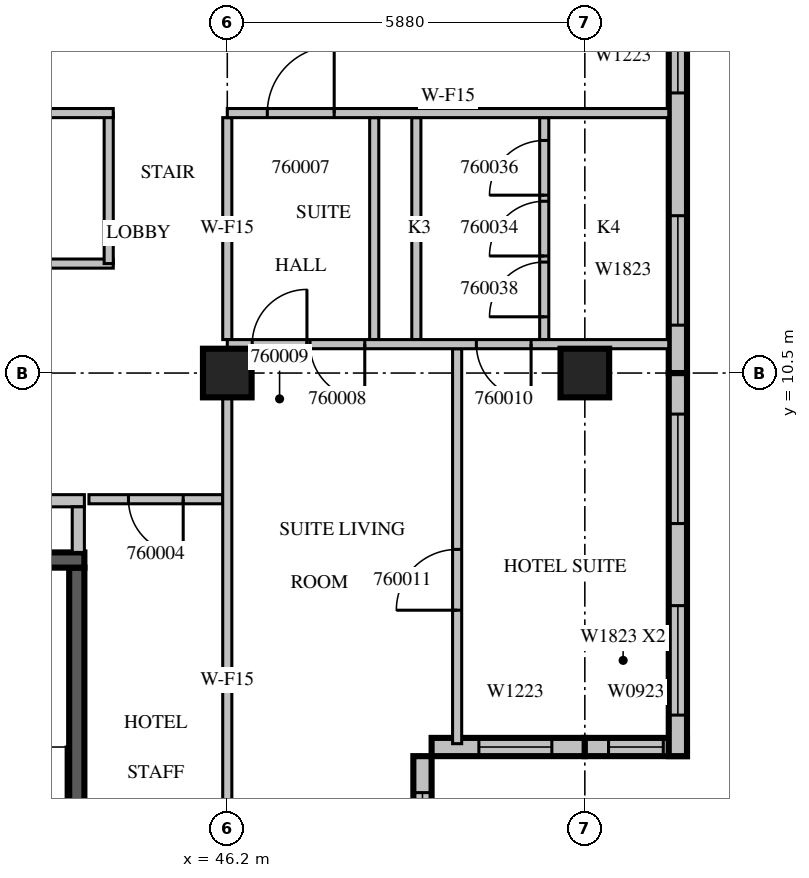
"""IFC4 building model, lengths in metres.
Left out: names, types, materials, properties, quantities, classifications, styles, units other than length and angle.
Written with IfcOpenShell. Run it as: python <this file> out.ifc"""

import sys

from ifc_helpers import new_model, si_unit, direction, frame, frame_2d, origin, origin_2d, place, context, subcontext, project, spatial, rectangle, extrude, source, transform, mapped, element, fill, save


model = new_model("IFC4")
c1 = context("Model", 3, precision=1e-05, world=origin(), true_north=direction((0.0, 1.0)))
c2 = subcontext(c1, "Body", "Model", "MODEL_VIEW")
j1 = project(units=[si_unit("LENGTHUNIT", "METRE"), si_unit("PLANEANGLEUNIT", "RADIAN")], contexts=[c1])
p1 = place(None, origin())
s1 = spatial("IfcSite", under=j1, at=p1, CompositionType="ELEMENT")
p2 = place(p1, origin())
s2 = spatial("IfcBuilding", under=s1, at=p2, CompositionType="ELEMENT")
p3 = place(p2, frame((0.0, 0.0, 261.4)))
s3 = spatial("IfcBuildingStorey", under=s2, at=p3, CompositionType="ELEMENT", Elevation=261.4)
m1 = source(origin(), c2, "Body", "SweptSolid", [
    extrude(rectangle(XDim=0.8, YDim=0.8, at=origin_2d()), origin(), (0.0, 0.0, 1.0), 3.8),
])
for number, where, z_axis, x_axis in (
    (1, (46.2, 10.5, 0.0), (0.0, 0.0, 1.0), (1.0, 0.0, 0.0)),
    (2, (52.08, 10.5, 0.0), (0.0, 0.0, 1.0), (1.0, 0.0, 0.0)),
):
    element("IfcColumn", number, at=place(p3, frame(where, z_axis=z_axis, x_axis=x_axis)), inside=s3, PredefinedType="COLUMN", context=c2, shape_type="MappedRepresentation", body=[
        mapped(m1, transform((0.0, 0.0, 0.0), scale=1.0)),
    ])
m2 = source(origin(), c2, "Body", "SweptSolid", [
    extrude(rectangle(XDim=4.2, YDim=0.3, at=frame_2d((2.1, 0.0))), origin(), (0.0, 0.0, 1.0), 3.4),
])
p4 = place(p3, frame((49.41, 0.0, 0.0), z_axis=(0.0, 0.0, 1.0), x_axis=(0.0, 1.0, 0.0)))
e3 = element("IfcWall", 3, at=p4, inside=s3, PredefinedType="STANDARD", context=c2, shape_type="MappedRepresentation", body=[
    mapped(m2, transform((0.0, 0.0, 0.0), scale=1.0)),
])
m3 = source(origin(), c2, "Body", "SweptSolid", [
    extrude(rectangle(XDim=3.0, YDim=2.3, at=frame_2d((1.5, 1.15))), frame((0.0, 0.16, 0.0), z_axis=(0.0, -1.0, 0.0), x_axis=(1.0, 0.0, 0.0)), (0.0, 0.0, 1.0), 0.32),
])
p5 = place(p4, frame((0.6, 0.0, 0.6)))
e4 = element("IfcOpeningElement", 4, at=p5, cuts=e3, PredefinedType="OPENING", context=c2, shape_type="MappedRepresentation", body=[
    mapped(m3, transform((0.0, 0.0, 0.0), scale=1.0)),
])
m4 = source(origin(), c2, "Body", "SweptSolid", [
    extrude(rectangle(XDim=2.52, YDim=0.3, at=frame_2d((1.26, 0.0))), origin(), (0.0, 0.0, 1.0), 3.4),
])
p6 = place(p3, frame((49.56, 4.35, 0.0), z_axis=(0.0, 0.0, 1.0), x_axis=(1.0, 0.0, 0.0)))
e5 = element("IfcWall", 5, at=p6, inside=s3, PredefinedType="STANDARD", context=c2, shape_type="MappedRepresentation", body=[
    mapped(m4, transform((0.0, 0.0, 0.0), scale=1.0)),
])
m5 = source(origin(), c2, "Body", "SweptSolid", [
    extrude(rectangle(XDim=1.2, YDim=2.3, at=frame_2d((0.6, 1.15))), frame((0.0, 0.16, 0.0), z_axis=(0.0, -1.0, 0.0), x_axis=(1.0, 0.0, 0.0)), (0.0, 0.0, 1.0), 0.32),
])
p7 = place(p6, frame((0.777, 0.0, 0.6)))
e6 = element("IfcOpeningElement", 6, at=p7, cuts=e5, PredefinedType="OPENING", context=c2, shape_type="MappedRepresentation", body=[
    mapped(m5, transform((0.0, 0.0, 0.0), scale=1.0)),
])
m6 = source(origin(), c2, "Body", "SweptSolid", [
    extrude(rectangle(XDim=1.68, YDim=0.3, at=frame_2d((0.84, 0.0))), origin(), (0.0, 0.0, 1.0), 3.4),
])
p8 = place(p3, frame((52.08, 4.35, 0.0), z_axis=(0.0, 0.0, 1.0), x_axis=(1.0, 0.0, 0.0)))
e7 = element("IfcWall", 7, at=p8, inside=s3, PredefinedType="STANDARD", context=c2, shape_type="MappedRepresentation", body=[
    mapped(m6, transform((0.0, 0.0, 0.0), scale=1.0)),
])
m7 = source(origin(), c2, "Body", "SweptSolid", [
    extrude(rectangle(XDim=0.9, YDim=2.3, at=frame_2d((0.45, 1.15))), frame((0.0, 0.16, 0.0), z_axis=(0.0, -1.0, 0.0), x_axis=(1.0, 0.0, 0.0)), (0.0, 0.0, 1.0), 0.32),
])
p9 = place(p8, frame((0.39, 0.0, 0.6)))
e8 = element("IfcOpeningElement", 8, at=p9, cuts=e7, PredefinedType="OPENING", context=c2, shape_type="MappedRepresentation", body=[
    mapped(m7, transform((0.0, 0.0, 0.0), scale=1.0)),
])
m8 = source(origin(), c2, "Body", "SweptSolid", [
    extrude(rectangle(XDim=6.3, YDim=0.3, at=frame_2d((3.15, 0.0))), origin(), (0.0, 0.0, 1.0), 3.4),
])
p10 = place(p3, frame((53.61, 4.2, 0.0), z_axis=(0.0, 0.0, 1.0), x_axis=(0.0, 1.0, 0.0)))
e9 = element("IfcWall", 9, at=p10, inside=s3, PredefinedType="STANDARD", context=c2, shape_type="MappedRepresentation", body=[
    mapped(m8, transform((0.0, 0.0, 0.0), scale=1.0)),
])
m9 = source(origin(), c2, "Body", "SweptSolid", [
    extrude(rectangle(XDim=1.8, YDim=2.3, at=frame_2d((0.9, 1.15))), frame((0.0, 0.16, 0.0), z_axis=(0.0, -1.0, 0.0), x_axis=(1.0, 0.0, 0.0)), (0.0, 0.0, 1.0), 0.32),
])
p11 = place(p10, frame((0.675, 0.0, 0.6)))
e10 = element("IfcOpeningElement", 10, at=p11, cuts=e9, PredefinedType="OPENING", context=c2, shape_type="MappedRepresentation", body=[
    mapped(m9, transform((0.0, 0.0, 0.0), scale=1.0)),
])
p12 = place(p10, frame((3.825, 0.0, 0.6)))
e11 = element("IfcOpeningElement", 11, at=p12, cuts=e9, PredefinedType="OPENING", context=c2, shape_type="MappedRepresentation", body=[
    mapped(m9, transform((0.0, 0.0, 0.0), scale=1.0)),
])
m10 = source(origin(), c2, "Body", "SweptSolid", [
    extrude(rectangle(XDim=6.75, YDim=0.3, at=frame_2d((3.375, 0.0))), origin(), (0.0, 0.0, 1.0), 3.4),
])
p13 = place(p3, frame((53.61, 10.5, 0.0), z_axis=(0.0, 0.0, 1.0), x_axis=(0.0, 1.0, 0.0)))
e12 = element("IfcWall", 12, at=p13, inside=s3, PredefinedType="STANDARD", context=c2, shape_type="MappedRepresentation", body=[
    mapped(m10, transform((0.0, 0.0, 0.0), scale=1.0)),
])
p14 = place(p13, frame((0.787, 0.0, 0.6)))
e13 = element("IfcOpeningElement", 13, at=p14, cuts=e12, PredefinedType="OPENING", context=c2, shape_type="MappedRepresentation", body=[
    mapped(m9, transform((0.0, 0.0, 0.0), scale=1.0)),
])
p15 = place(p13, frame((4.606, 0.0, 0.6)))
e14 = element("IfcOpeningElement", 14, at=p15, cuts=e12, PredefinedType="OPENING", context=c2, shape_type="MappedRepresentation", body=[
    mapped(m5, transform((0.0, 0.0, 0.0), scale=1.0)),
])
m11 = source(origin(), c2, "Body", "SweptSolid", [
    extrude(rectangle(XDim=7.0, YDim=0.25, at=frame_2d((3.5, 0.0))), origin(), (0.0, 0.0, 1.0), 3.4),
])
p16 = place(p3, frame((43.725, 0.3, 0.0), z_axis=(0.0, 0.0, 1.0), x_axis=(0.0, 1.0, 0.0)))
e15 = element("IfcWall", 15, at=p16, inside=s3, PredefinedType="SOLIDWALL", context=c2, shape_type="MappedRepresentation", body=[
    mapped(m11, transform((0.0, 0.0, 0.0), scale=1.0)),
])
m12 = source(origin(), c2, "Body", "SweptSolid", [
    extrude(rectangle(XDim=3.45, YDim=0.25, at=frame_2d((1.725, 0.0))), origin(), (0.0, 0.0, 1.0), 3.4),
])
p17 = place(p3, frame((40.4, 7.425, 0.0), z_axis=(0.0, 0.0, 1.0), x_axis=(1.0, 0.0, 0.0)))
e16 = element("IfcWall", 16, at=p17, inside=s3, PredefinedType="SOLIDWALL", context=c2, shape_type="MappedRepresentation", body=[
    mapped(m12, transform((0.0, 0.0, 0.0), scale=1.0)),
])
m13 = source(origin(), c2, "Body", "SweptSolid", [
    extrude(rectangle(XDim=5.45, YDim=0.2, at=frame_2d((2.725, 0.0))), origin(), (0.0, 0.0, 1.0), 3.4),
])
p18 = place(p3, frame((38.4, 8.4, 0.0), z_axis=(0.0, 0.0, 1.0), x_axis=(1.0, 0.0, 0.0)))
e17 = element("IfcWall", 17, at=p18, inside=s3, PredefinedType="PARTITIONING", context=c2, shape_type="MappedRepresentation", body=[
    mapped(m13, transform((0.0, 0.0, 0.0), scale=1.0)),
])
m14 = source(origin(), c2, "Body", "SweptSolid", [
    extrude(rectangle(XDim=1.2, YDim=2.1, at=frame_2d((0.6, 1.05))), frame((0.0, 0.11, 0.0), z_axis=(0.0, -1.0, 0.0), x_axis=(1.0, 0.0, 0.0)), (0.0, 0.0, 1.0), 0.22),
])
p19 = place(p18, frame((0.4, 0.0, 0.0)))
e18 = element("IfcOpeningElement", 18, at=p19, cuts=e17, PredefinedType="OPENING", context=c2, shape_type="MappedRepresentation", body=[
    mapped(m14, transform((0.0, 0.0, 0.0), scale=1.0)),
])
m15 = source(origin(), c2, "Body", "SweptSolid", [
    extrude(rectangle(XDim=0.9, YDim=2.1, at=frame_2d((0.45, 1.05))), frame((0.0, 0.11, 0.0), z_axis=(0.0, -1.0, 0.0), x_axis=(1.0, 0.0, 0.0)), (0.0, 0.0, 1.0), 0.22),
])
p20 = place(p18, frame((3.25, 0.0, 0.0)))
e19 = element("IfcOpeningElement", 19, at=p20, cuts=e17, PredefinedType="OPENING", context=c2, shape_type="MappedRepresentation", body=[
    mapped(m15, transform((0.0, 0.0, 0.0), scale=1.0)),
])
m16 = source(origin(), c2, "Body", "SweptSolid", [
    extrude(rectangle(XDim=0.75, YDim=0.2, at=frame_2d((0.375, 0.0))), origin(), (0.0, 0.0, 1.0), 3.4),
])
p21 = place(p3, frame((43.75, 7.55, 0.0), z_axis=(0.0, 0.0, 1.0), x_axis=(0.0, 1.0, 0.0)))
e20 = element("IfcWall", 20, at=p21, inside=s3, PredefinedType="PARTITIONING", context=c2, shape_type="MappedRepresentation", body=[
    mapped(m16, transform((0.0, 0.0, 0.0), scale=1.0)),
])
m17 = source(origin(), c2, "Body", "SweptSolid", [
    extrude(rectangle(XDim=6.45, YDim=0.15, at=frame_2d((3.225, 0.0))), origin(), (0.0, 0.0, 1.0), 3.4),
])
p22 = place(p3, frame((37.875, 12.3, 0.0), z_axis=(0.0, 0.0, 1.0), x_axis=(1.0, 0.0, 0.0)))
e21 = element("IfcWall", 21, at=p22, inside=s3, PredefinedType="PARTITIONING", context=c2, shape_type="MappedRepresentation", body=[
    mapped(m17, transform((0.0, 0.0, 0.0), scale=1.0)),
])
m18 = source(origin(), c2, "Body", "SweptSolid", [
    extrude(rectangle(XDim=2.475, YDim=0.15, at=frame_2d((1.238, 0.0))), origin(), (0.0, 0.0, 1.0), 3.4),
])
p23 = place(p3, frame((44.25, 12.3, 0.0), z_axis=(0.0, 0.0, 1.0), x_axis=(0.0, 1.0, 0.0)))
e22 = element("IfcWall", 22, at=p23, inside=s3, PredefinedType="PARTITIONING", context=c2, shape_type="MappedRepresentation", body=[
    mapped(m18, transform((0.0, 0.0, 0.0), scale=1.0)),
])
p24 = place(p3, frame((44.325, 14.775, 0.0), z_axis=(0.0, 0.0, 1.0), x_axis=(-1.0, 0.0, 0.0)))
e23 = element("IfcWall", 23, at=p24, inside=s3, PredefinedType="PARTITIONING", context=c2, shape_type="MappedRepresentation", body=[
    mapped(m17, transform((0.0, 0.0, 0.0), scale=1.0)),
])
m19 = source(origin(), c2, "Body", "SweptSolid", [
    extrude(rectangle(XDim=0.9, YDim=2.1, at=frame_2d((0.45, 1.05))), frame((0.0, 0.085, 0.0), z_axis=(0.0, -1.0, 0.0), x_axis=(1.0, 0.0, 0.0)), (0.0, 0.0, 1.0), 0.17),
])
p25 = place(p24, frame((2.812, 0.0, 0.0)))
e24 = element("IfcOpeningElement", 24, at=p25, cuts=e23, PredefinedType="OPENING", context=c2, shape_type="MappedRepresentation", body=[
    mapped(m19, transform((0.0, 0.0, 0.0), scale=1.0)),
])
m20 = source(origin(), c2, "Body", "SweptSolid", [
    extrude(rectangle(XDim=2.2, YDim=0.15, at=frame_2d((1.1, 0.0))), origin(), (0.0, 0.0, 1.0), 3.4),
])
p26 = place(p3, frame((46.125, 8.425, 0.0), z_axis=(0.0, 0.0, 1.0), x_axis=(-1.0, 0.0, 0.0)))
e25 = element("IfcWall", 25, at=p26, inside=s3, PredefinedType="PARTITIONING", context=c2, shape_type="MappedRepresentation", body=[
    mapped(m20, transform((0.0, 0.0, 0.0), scale=1.0)),
])
p27 = place(p26, frame((0.65, 0.0, 0.0)))
e26 = element("IfcOpeningElement", 26, at=p27, cuts=e25, PredefinedType="OPENING", context=c2, shape_type="MappedRepresentation", body=[
    mapped(m19, transform((0.0, 0.0, 0.0), scale=1.0)),
])
m21 = source(origin(), c2, "Body", "SweptSolid", [
    extrude(rectangle(XDim=6.495, YDim=0.15, at=frame_2d((3.248, 0.0))), origin(), (0.0, 0.0, 1.0), 3.4),
])
p28 = place(p3, frame((49.98, 4.405, 0.0), z_axis=(0.0, 0.0, 1.0), x_axis=(0.0, 1.0, 0.0)))
e27 = element("IfcWall", 27, at=p28, inside=s3, PredefinedType="PARTITIONING", context=c2, shape_type="MappedRepresentation", body=[
    mapped(m21, transform((0.0, 0.0, 0.0), scale=1.0)),
])
m22 = source(origin(), c2, "Body", "SweptSolid", [
    extrude(rectangle(XDim=1.0, YDim=2.1, at=frame_2d((0.5, 1.05))), frame((0.0, 0.085, 0.0), z_axis=(0.0, -1.0, 0.0), x_axis=(1.0, 0.0, 0.0)), (0.0, 0.0, 1.0), 0.17),
])
p29 = place(p28, frame((2.195, 0.0, 0.0)))
e28 = element("IfcOpeningElement", 28, at=p29, cuts=e27, PredefinedType="OPENING", context=c2, shape_type="MappedRepresentation", body=[
    mapped(m22, transform((0.0, 0.0, 0.0), scale=1.0)),
])
m23 = source(origin(), c2, "Body", "SweptSolid", [
    extrude(rectangle(XDim=3.65, YDim=0.15, at=frame_2d((1.825, 0.0))), origin(), (0.0, 0.0, 1.0), 3.4),
])
for number, where, z_axis, x_axis in (
    (29, (48.617, 11.05, 0.0), (0.0, 0.0, 1.0), (0.0, 1.0, 0.0)),
    (30, (49.309, 11.05, 0.0), (0.0, 0.0, 1.0), (0.0, 1.0, 0.0)),
):
    element("IfcWall", number, at=place(p3, frame(where, z_axis=z_axis, x_axis=x_axis)), inside=s3, PredefinedType="PARTITIONING", context=c2, shape_type="MappedRepresentation", body=[
        mapped(m23, transform((0.0, 0.0, 0.0), scale=1.0)),
    ])
p30 = place(p3, frame((51.412, 11.05, 0.0), z_axis=(0.0, 0.0, 1.0), x_axis=(0.0, 1.0, 0.0)))
e31 = element("IfcWall", 31, at=p30, inside=s3, PredefinedType="PARTITIONING", context=c2, shape_type="MappedRepresentation", body=[
    mapped(m23, transform((0.0, 0.0, 0.0), scale=1.0)),
])
p31 = place(p30, frame((1.375, 0.0, 0.0)))
e32 = element("IfcOpeningElement", 32, at=p31, cuts=e31, PredefinedType="OPENING", context=c2, shape_type="MappedRepresentation", body=[
    mapped(m19, transform((0.0, 0.0, 0.0), scale=1.0)),
])
p32 = place(p30, frame((2.375, 0.0, 0.0)))
e33 = element("IfcOpeningElement", 33, at=p32, cuts=e31, PredefinedType="OPENING", context=c2, shape_type="MappedRepresentation", body=[
    mapped(m19, transform((0.0, 0.0, 0.0), scale=1.0)),
])
p33 = place(p30, frame((0.375, 0.0, 0.0)))
e34 = element("IfcOpeningElement", 34, at=p33, cuts=e31, PredefinedType="OPENING", context=c2, shape_type="MappedRepresentation", body=[
    mapped(m19, transform((0.0, 0.0, 0.0), scale=1.0)),
])
m24 = source(origin(), c2, "Body", "SweptSolid", [
    extrude(rectangle(XDim=9.302, YDim=0.15, at=frame_2d((4.651, 0.0))), origin(), (0.0, 0.0, 1.0), 3.4),
])
p34 = place(p3, frame((46.2, 0.799, 0.0), z_axis=(0.0, 0.0, 1.0), x_axis=(0.0, 1.0, 0.0)))
e35 = element("IfcWall", 35, at=p34, inside=s3, PredefinedType="PARTITIONING", context=c2, shape_type="MappedRepresentation", body=[
    mapped(m24, transform((0.0, 0.0, 0.0), scale=1.0)),
])
p35 = place(p3, frame((46.2, 11.05, 0.0), z_axis=(0.0, 0.0, 1.0), x_axis=(0.0, 1.0, 0.0)))
e36 = element("IfcWall", 36, at=p35, inside=s3, PredefinedType="PARTITIONING", context=c2, shape_type="MappedRepresentation", body=[
    mapped(m23, transform((0.0, 0.0, 0.0), scale=1.0)),
])
m25 = source(origin(), c2, "Body", "SweptSolid", [
    extrude(rectangle(XDim=7.26, YDim=0.15, at=frame_2d((3.63, 0.0))), origin(), (0.0, 0.0, 1.0), 3.4),
])
p36 = place(p3, frame((53.46, 10.975, 0.0), z_axis=(0.0, 0.0, 1.0), x_axis=(-1.0, 0.0, 0.0)))
e37 = element("IfcWall", 37, at=p36, inside=s3, PredefinedType="PARTITIONING", context=c2, shape_type="MappedRepresentation", body=[
    mapped(m25, transform((0.0, 0.0, 0.0), scale=1.0)),
])
p37 = place(p36, frame((4.999, 0.0, 0.0)))
e38 = element("IfcOpeningElement", 38, at=p37, cuts=e37, PredefinedType="OPENING", context=c2, shape_type="MappedRepresentation", body=[
    mapped(m19, transform((0.0, 0.0, 0.0), scale=1.0)),
])
p38 = place(p36, frame((5.95, 0.0, 0.0)))
e39 = element("IfcOpeningElement", 39, at=p38, cuts=e37, PredefinedType="OPENING", context=c2, shape_type="MappedRepresentation", body=[
    mapped(m19, transform((0.0, 0.0, 0.0), scale=1.0)),
])
p39 = place(p36, frame((2.264, 0.0, 0.0)))
e40 = element("IfcOpeningElement", 40, at=p39, cuts=e37, PredefinedType="OPENING", context=c2, shape_type="MappedRepresentation", body=[
    mapped(m19, transform((0.0, 0.0, 0.0), scale=1.0)),
])
p40 = place(p3, frame((53.46, 14.775, 0.0), z_axis=(0.0, 0.0, 1.0), x_axis=(-1.0, 0.0, 0.0)))
e41 = element("IfcWall", 41, at=p40, inside=s3, PredefinedType="PARTITIONING", context=c2, shape_type="MappedRepresentation", body=[
    mapped(m25, transform((0.0, 0.0, 0.0), scale=1.0)),
])
m26 = source(origin(), c2, "Body", "SweptSolid", [
    extrude(rectangle(XDim=1.1, YDim=2.1, at=frame_2d((0.55, 1.05))), frame((0.0, 0.085, 0.0), z_axis=(0.0, -1.0, 0.0), x_axis=(1.0, 0.0, 0.0)), (0.0, 0.0, 1.0), 0.17),
])
p41 = place(p40, frame((5.502, 0.0, 0.0)))
e42 = element("IfcOpeningElement", 42, at=p41, cuts=e41, PredefinedType="OPENING", context=c2, shape_type="MappedRepresentation", body=[
    mapped(m26, transform((0.0, 0.0, 0.0), scale=1.0)),
])
m27 = source(origin(), c2, "Body", "SweptSolid", [
    extrude(rectangle(XDim=3.0, YDim=2.3, at=frame_2d((1.5, 1.15))), frame((0.0, 0.03, 0.0), z_axis=(0.0, -1.0, 0.0), x_axis=(1.0, 0.0, 0.0)), (0.0, 0.0, 1.0), 0.06),
])
p42 = place(p5, origin())
e43 = element("IfcWindow", 43, at=p42, inside=s3, PartitioningType="SINGLE_PANEL", PredefinedType="WINDOW", context=c2, shape_type="MappedRepresentation", body=[
    mapped(m27, transform((0.0, 0.0, 0.0), scale=1.0)),
])
fill(e4, e43)
m28 = source(origin(), c2, "Body", "SweptSolid", [
    extrude(rectangle(XDim=1.2, YDim=2.3, at=frame_2d((0.6, 1.15))), frame((0.0, 0.03, 0.0), z_axis=(0.0, -1.0, 0.0), x_axis=(1.0, 0.0, 0.0)), (0.0, 0.0, 1.0), 0.06),
])
p43 = place(p7, origin())
e44 = element("IfcWindow", 44, at=p43, inside=s3, PartitioningType="SINGLE_PANEL", PredefinedType="WINDOW", context=c2, shape_type="MappedRepresentation", body=[
    mapped(m28, transform((0.0, 0.0, 0.0), scale=1.0)),
])
fill(e6, e44)
m29 = source(origin(), c2, "Body", "SweptSolid", [
    extrude(rectangle(XDim=0.9, YDim=2.3, at=frame_2d((0.45, 1.15))), frame((0.0, 0.03, 0.0), z_axis=(0.0, -1.0, 0.0), x_axis=(1.0, 0.0, 0.0)), (0.0, 0.0, 1.0), 0.06),
])
p44 = place(p9, origin())
e45 = element("IfcWindow", 45, at=p44, inside=s3, PartitioningType="SINGLE_PANEL", PredefinedType="WINDOW", context=c2, shape_type="MappedRepresentation", body=[
    mapped(m29, transform((0.0, 0.0, 0.0), scale=1.0)),
])
fill(e8, e45)
m30 = source(origin(), c2, "Body", "SweptSolid", [
    extrude(rectangle(XDim=1.8, YDim=2.3, at=frame_2d((0.9, 1.15))), frame((0.0, 0.03, 0.0), z_axis=(0.0, -1.0, 0.0), x_axis=(1.0, 0.0, 0.0)), (0.0, 0.0, 1.0), 0.06),
])
p45 = place(p11, origin())
e46 = element("IfcWindow", 46, at=p45, inside=s3, PartitioningType="SINGLE_PANEL", PredefinedType="WINDOW", context=c2, shape_type="MappedRepresentation", body=[
    mapped(m30, transform((0.0, 0.0, 0.0), scale=1.0)),
])
fill(e10, e46)
p46 = place(p12, origin())
e47 = element("IfcWindow", 47, at=p46, inside=s3, PartitioningType="SINGLE_PANEL", PredefinedType="WINDOW", context=c2, shape_type="MappedRepresentation", body=[
    mapped(m30, transform((0.0, 0.0, 0.0), scale=1.0)),
])
fill(e11, e47)
p47 = place(p14, origin())
e48 = element("IfcWindow", 48, at=p47, inside=s3, PartitioningType="SINGLE_PANEL", PredefinedType="WINDOW", context=c2, shape_type="MappedRepresentation", body=[
    mapped(m30, transform((0.0, 0.0, 0.0), scale=1.0)),
])
fill(e13, e48)
p48 = place(p15, origin())
e49 = element("IfcWindow", 49, at=p48, inside=s3, PartitioningType="SINGLE_PANEL", PredefinedType="WINDOW", context=c2, shape_type="MappedRepresentation", body=[
    mapped(m28, transform((0.0, 0.0, 0.0), scale=1.0)),
])
fill(e14, e49)
m31 = source(origin(), c2, "Body", "SweptSolid", [
    extrude(rectangle(XDim=0.9, YDim=2.1, at=frame_2d((0.45, 1.05))), frame((0.0, 0.025, 0.0), z_axis=(0.0, -1.0, 0.0), x_axis=(1.0, 0.0, 0.0)), (0.0, 0.0, 1.0), 0.05),
])
p49 = place(p27, origin())
e50 = element("IfcDoor", 50, at=p49, inside=s3, OperationType="SINGLE_SWING_LEFT", PredefinedType="DOOR", context=c2, shape_type="MappedRepresentation", body=[
    mapped(m31, transform((0.0, 0.0, 0.0), scale=1.0)),
])
fill(e26, e50)
m32 = source(origin(), c2, "Body", "SweptSolid", [
    extrude(rectangle(XDim=1.1, YDim=2.1, at=frame_2d((0.55, 1.05))), frame((0.0, 0.025, 0.0), z_axis=(0.0, -1.0, 0.0), x_axis=(1.0, 0.0, 0.0)), (0.0, 0.0, 1.0), 0.05),
])
p50 = place(p41, origin())
e51 = element("IfcDoor", 51, at=p50, inside=s3, OperationType="SINGLE_SWING_RIGHT", PredefinedType="DOOR", context=c2, shape_type="MappedRepresentation", body=[
    mapped(m32, transform((0.0, 0.0, 0.0), scale=1.0)),
])
fill(e42, e51)
p51 = place(p37, origin())
e52 = element("IfcDoor", 52, at=p51, inside=s3, OperationType="SINGLE_SWING_LEFT", PredefinedType="DOOR", context=c2, shape_type="MappedRepresentation", body=[
    mapped(m31, transform((0.0, 0.0, 0.0), scale=1.0)),
])
fill(e38, e52)
p52 = place(p38, origin())
e53 = element("IfcDoor", 53, at=p52, inside=s3, OperationType="SINGLE_SWING_RIGHT", PredefinedType="DOOR", context=c2, shape_type="MappedRepresentation", body=[
    mapped(m31, transform((0.0, 0.0, 0.0), scale=1.0)),
])
fill(e39, e53)
p53 = place(p39, origin())
e54 = element("IfcDoor", 54, at=p53, inside=s3, OperationType="SINGLE_SWING_LEFT", PredefinedType="DOOR", context=c2, shape_type="MappedRepresentation", body=[
    mapped(m31, transform((0.0, 0.0, 0.0), scale=1.0)),
])
fill(e40, e54)
m33 = source(origin(), c2, "Body", "SweptSolid", [
    extrude(rectangle(XDim=1.0, YDim=2.1, at=frame_2d((0.5, 1.05))), frame((0.0, 0.025, 0.0), z_axis=(0.0, -1.0, 0.0), x_axis=(1.0, 0.0, 0.0)), (0.0, 0.0, 1.0), 0.05),
])
p54 = place(p29, origin())
e55 = element("IfcDoor", 55, at=p54, inside=s3, OperationType="SINGLE_SWING_LEFT", PredefinedType="DOOR", context=c2, shape_type="MappedRepresentation", body=[
    mapped(m33, transform((0.0, 0.0, 0.0), scale=1.0)),
])
fill(e28, e55)
p55 = place(p31, origin())
e56 = element("IfcDoor", 56, at=p55, inside=s3, OperationType="SINGLE_SWING_LEFT", PredefinedType="DOOR", context=c2, shape_type="MappedRepresentation", body=[
    mapped(m31, transform((0.0, 0.0, 0.0), scale=1.0)),
])
fill(e32, e56)
p56 = place(p32, origin())
e57 = element("IfcDoor", 57, at=p56, inside=s3, OperationType="SINGLE_SWING_LEFT", PredefinedType="DOOR", context=c2, shape_type="MappedRepresentation", body=[
    mapped(m31, transform((0.0, 0.0, 0.0), scale=1.0)),
])
fill(e33, e57)
p57 = place(p33, origin())
e58 = element("IfcDoor", 58, at=p57, inside=s3, OperationType="SINGLE_SWING_LEFT", PredefinedType="DOOR", context=c2, shape_type="MappedRepresentation", body=[
    mapped(m31, transform((0.0, 0.0, 0.0), scale=1.0)),
])
fill(e34, e58)
save(model, sys.argv[1])
